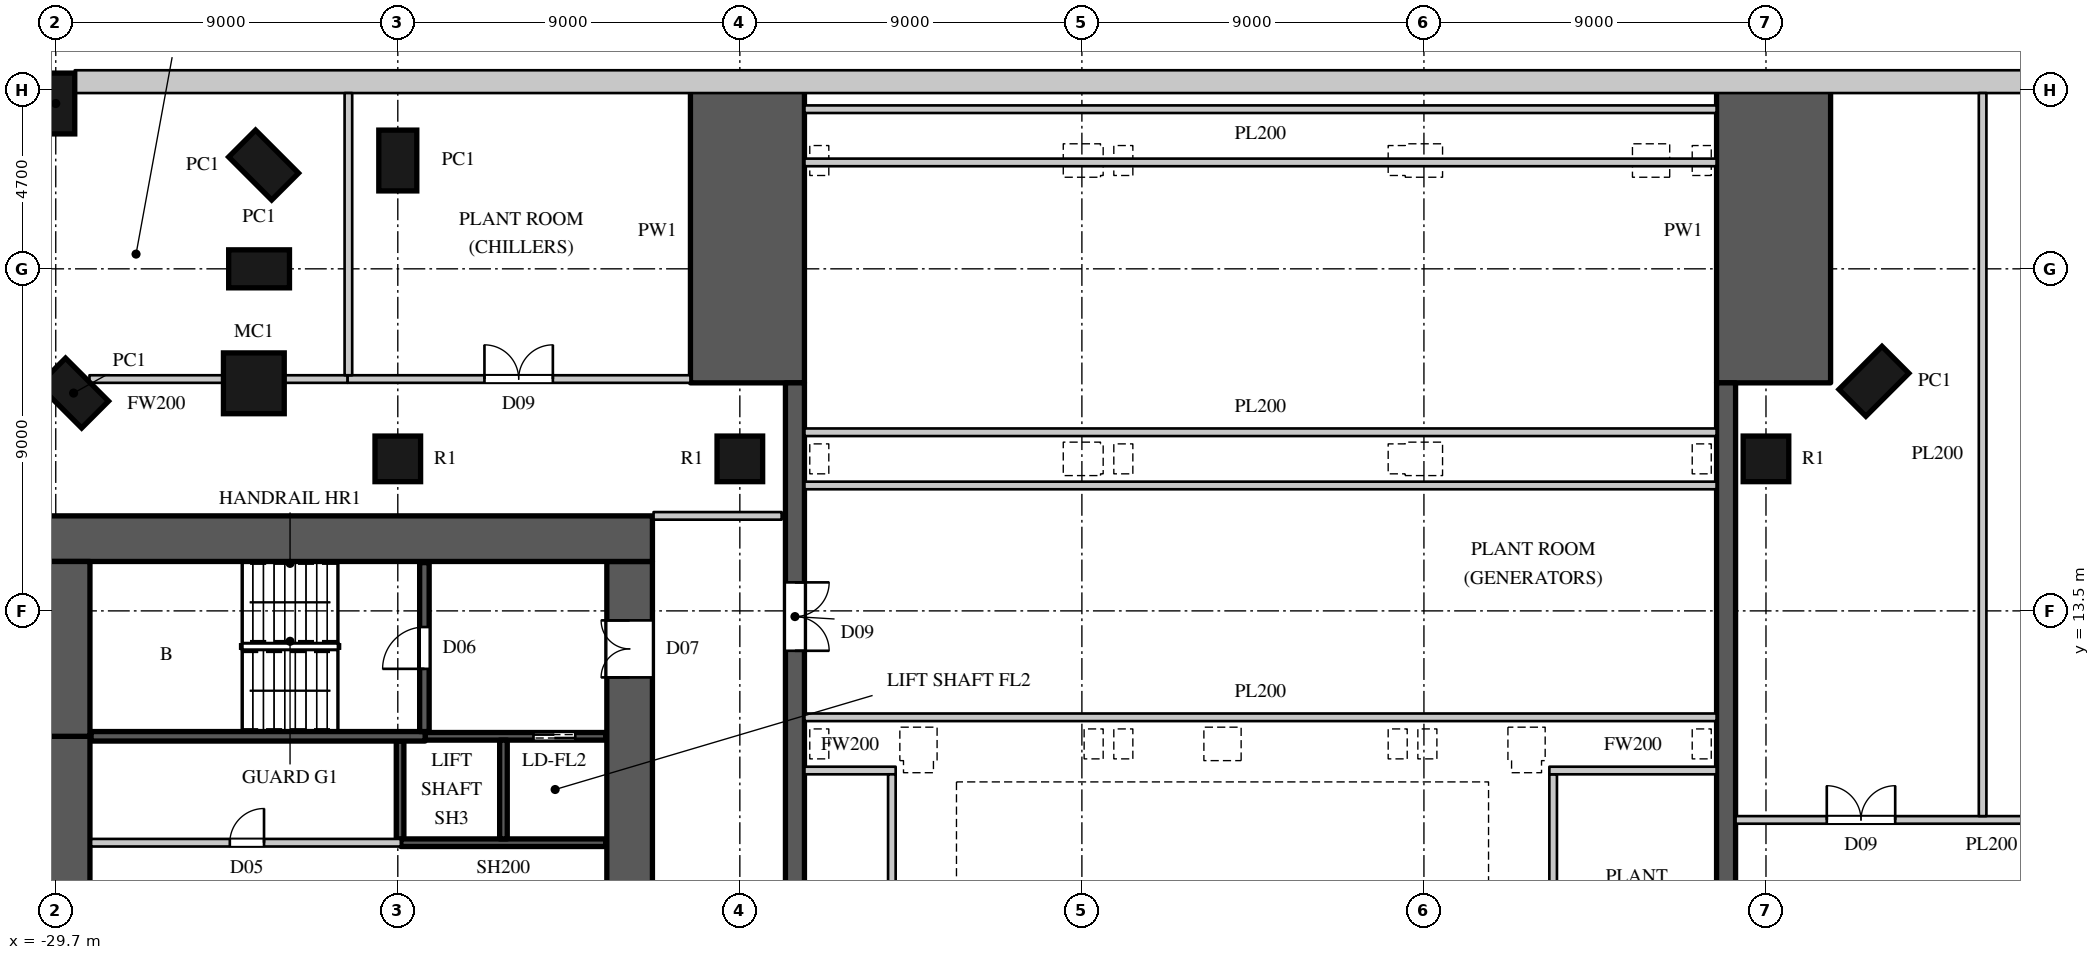
"""IFC4 building model, lengths in metres.
Left out: names, types, materials, properties, quantities, classifications, styles, units other than length and angle.
Written with IfcOpenShell. Run it as: python <this file> out.ifc"""

import sys

from ifc_helpers import new_model, si_unit, direction, frame, frame_2d, origin, origin_2d, place, context, subcontext, project, spatial, rectangle, circle, extrude, element, fill, save


model = new_model("IFC4")
c1 = context("Model", 3, precision=1e-05, world=origin(), true_north=direction((0.0, 1.0)))
c2 = subcontext(c1, "Body", "Model", "MODEL_VIEW")
j1 = project(units=[si_unit("LENGTHUNIT", "METRE"), si_unit("PLANEANGLEUNIT", "RADIAN")], contexts=[c1])
p1 = place(None, origin())
s1 = spatial("IfcSite", under=j1, at=p1, CompositionType="ELEMENT")
p2 = place(p1, origin())
s2 = spatial("IfcBuilding", under=s1, at=p2, CompositionType="ELEMENT")
p3 = place(p2, frame((0.0, 0.0, 29.0)))
s3 = spatial("IfcBuildingStorey", under=s2, at=p3, CompositionType="ELEMENT", Elevation=29.0)
for number, where, z_axis, x_axis in (
    (1, (-11.5, 19.5, 0.0), (0.0, 0.0, 1.0), (0.0, 1.0, 0.0)),
    (2, (15.5, 19.5, 0.0), (0.0, 0.0, 1.0), (0.0, 1.0, 0.0)),
):
    element("IfcWall", number, at=place(p3, frame(where, z_axis=z_axis, x_axis=x_axis)), inside=s3, PredefinedType="SOLIDWALL", context=c2, shape_type="SweptSolid", body=[
        extrude(rectangle(XDim=8.0, YDim=3.0, at=frame_2d((4.0, 0.0))), origin(), (0.0, 0.0, 1.0), 7.0),
    ])
p4 = place(p3, frame((-10.25, -19.5, 0.0), z_axis=(0.0, 0.0, 1.0), x_axis=(0.0, 1.0, 0.0)))
e3 = element("IfcWall", 3, at=p4, inside=s3, PredefinedType="SOLIDWALL", context=c2, shape_type="SweptSolid", body=[
    extrude(rectangle(XDim=39.0, YDim=0.5, at=frame_2d((19.5, 0.0))), origin(), (0.0, 0.0, 1.0), 7.0),
])
p5 = place(p4, frame((18.75, 0.0, 0.0)))
e4 = element("IfcOpeningElement", 4, at=p5, cuts=e3, PredefinedType="OPENING", context=c2, shape_type="SweptSolid", body=[
    extrude(rectangle(XDim=1.5, YDim=2.4, at=frame_2d((0.75, 1.2))), frame((0.0, 0.26, 0.0), z_axis=(0.0, -1.0, 0.0), x_axis=(1.0, 0.0, 0.0)), (0.0, 0.0, 1.0), 0.52),
])
p6 = place(p4, frame((31.95, 0.0, 0.0)))
e5 = element("IfcOpeningElement", 5, at=p6, cuts=e3, PredefinedType="OPENING", context=c2, shape_type="SweptSolid", body=[
    extrude(rectangle(XDim=1.8, YDim=2.4, at=frame_2d((0.9, 1.2))), frame((0.0, 0.26, 0.0), z_axis=(0.0, -1.0, 0.0), x_axis=(1.0, 0.0, 0.0)), (0.0, 0.0, 1.0), 0.52),
])
p7 = place(p4, frame((5.25, 0.0, 0.0)))
e6 = element("IfcOpeningElement", 6, at=p7, cuts=e3, PredefinedType="OPENING", context=c2, shape_type="SweptSolid", body=[
    extrude(rectangle(XDim=1.8, YDim=2.4, at=frame_2d((0.9, 1.2))), frame((0.0, 0.26, 0.0), z_axis=(0.0, -1.0, 0.0), x_axis=(1.0, 0.0, 0.0)), (0.0, 0.0, 1.0), 0.52),
])
p8 = place(p3, frame((14.25, -19.5, 0.0), z_axis=(0.0, 0.0, 1.0), x_axis=(0.0, 1.0, 0.0)))
e7 = element("IfcWall", 7, at=p8, inside=s3, PredefinedType="SOLIDWALL", context=c2, shape_type="SweptSolid", body=[
    extrude(rectangle(XDim=39.0, YDim=0.5, at=frame_2d((19.5, 0.0))), origin(), (0.0, 0.0, 1.0), 7.0),
])
for number, where, z_axis, x_axis in (
    (8, (-29.231, 19.231, 0.0), (0.0, 0.0, 1.0), (-0.707, -0.707, 0.0)),
    (9, (18.14, 19.54, 0.0), (0.0, 0.0, 1.0), (-0.707, 0.707, 0.0)),
    (10, (-20.7, 25.35, 0.0), (0.0, 0.0, 1.0), (-1.0, 0.0, 0.0)),
    (11, (-24.231, 25.231, 0.0), (0.0, 0.0, 1.0), (-0.707, -0.707, 0.0)),
    (12, (-24.35, 22.5, 0.0), (0.0, 0.0, 1.0), (0.0, -1.0, 0.0)),
):
    element("IfcColumn", number, at=place(p3, frame(where, z_axis=z_axis, x_axis=x_axis)), inside=s3, PredefinedType="COLUMN", context=c2, shape_type="SweptSolid", body=[
        extrude(rectangle(XDim=1.0, YDim=1.6, at=origin_2d()), origin(), (0.0, 0.0, 1.0), 7.0),
    ])
p9 = place(p3, frame((-24.488, 19.488, 0.0), z_axis=(0.0, 0.0, 1.0), x_axis=(1.0, 0.0, 0.0)))
e13 = element("IfcColumn", 13, at=p9, inside=s3, PredefinedType="COLUMN", context=c2, shape_type="SweptSolid", body=[
    extrude(circle(Radius=0.8, at=origin_2d()), origin(), (0.0, 0.0, 1.0), 7.0),
])
p10 = place(p3, frame((-29.7, 26.85, 0.0), z_axis=(0.0, 0.0, 1.0), x_axis=(-1.0, 0.0, 0.0)))
e14 = element("IfcColumn", 14, at=p10, inside=s3, PredefinedType="COLUMN", context=c2, shape_type="SweptSolid", body=[
    extrude(rectangle(XDim=1.0, YDim=1.6, at=origin_2d()), origin(), (0.0, 0.0, 1.0), 7.0),
])
for number, where, z_axis, x_axis in (
    (15, (-20.7, 17.5, 0.0), (0.0, 0.0, 1.0), (1.0, 0.0, 0.0)),
    (16, (-11.7, 17.5, 0.0), (0.0, 0.0, 1.0), (1.0, 0.0, 0.0)),
    (17, (15.3, 17.5, 0.0), (0.0, 0.0, 1.0), (1.0, 0.0, 0.0)),
):
    element("IfcColumn", number, at=place(p3, frame(where, z_axis=z_axis, x_axis=x_axis)), inside=s3, PredefinedType="COLUMN", context=c2, shape_type="SweptSolid", body=[
        extrude(circle(Radius=0.6, at=origin_2d()), origin(), (0.0, 0.0, 1.0), 7.0),
    ])
p11 = place(p3, frame((24.334, 27.425, 0.0), z_axis=(0.0, 0.0, 1.0), x_axis=(-1.0, 0.0, 0.0)))
e18 = element("IfcWall", 18, at=p11, inside=s3, PredefinedType="ELEMENTEDWALL", context=c2, shape_type="SweptSolid", body=[
    extrude(rectangle(XDim=53.534, YDim=0.6, at=frame_2d((26.767, 0.0))), origin(), (0.0, 0.0, 1.0), 6.6),
])
p12 = place(p3, frame((-30.0, 15.4, 0.0), z_axis=(0.0, 0.0, 1.0), x_axis=(1.0, 0.0, 0.0)))
e19 = element("IfcWall", 19, at=p12, inside=s3, PredefinedType="SHEAR", context=c2, shape_type="SweptSolid", body=[
    extrude(rectangle(XDim=16.0, YDim=1.2, at=frame_2d((8.0, 0.0))), origin(), (0.0, 0.0, 1.0), 7.0),
])
p13 = place(p3, frame((-14.6, -14.8, 0.0), z_axis=(0.0, 0.0, 1.0), x_axis=(0.0, 1.0, 0.0)))
e20 = element("IfcWall", 20, at=p13, inside=s3, PredefinedType="SHEAR", context=c2, shape_type="SweptSolid", body=[
    extrude(rectangle(XDim=29.6, YDim=1.2, at=frame_2d((14.8, 0.0))), origin(), (0.0, 0.0, 1.0), 7.0),
])
p14 = place(p13, frame((1.55, 0.0, 0.0)))
e21 = element("IfcOpeningElement", 21, at=p14, cuts=e20, PredefinedType="OPENING", context=c2, shape_type="SweptSolid", body=[
    extrude(rectangle(XDim=1.5, YDim=2.4, at=frame_2d((0.75, 1.2))), frame((0.0, 0.61, 0.0), z_axis=(0.0, -1.0, 0.0), x_axis=(1.0, 0.0, 0.0)), (0.0, 0.0, 1.0), 1.22),
])
p15 = place(p13, frame((26.55, 0.0, 0.0)))
e22 = element("IfcOpeningElement", 22, at=p15, cuts=e20, PredefinedType="OPENING", context=c2, shape_type="SweptSolid", body=[
    extrude(rectangle(XDim=1.5, YDim=2.4, at=frame_2d((0.75, 1.2))), frame((0.0, 0.61, 0.0), z_axis=(0.0, -1.0, 0.0), x_axis=(1.0, 0.0, 0.0)), (0.0, 0.0, 1.0), 1.22),
])
p16 = place(p13, frame((8.45, 0.0, 0.0)))
e23 = element("IfcOpeningElement", 23, at=p16, cuts=e20, PredefinedType="OPENING", context=c2, shape_type="SweptSolid", body=[
    extrude(rectangle(XDim=1.5, YDim=2.4, at=frame_2d((0.75, 1.2))), frame((0.0, 0.61, 0.0), z_axis=(0.0, -1.0, 0.0), x_axis=(1.0, 0.0, 0.0)), (0.0, 0.0, 1.0), 1.22),
])
p17 = place(p13, frame((19.65, 0.0, 0.0)))
e24 = element("IfcOpeningElement", 24, at=p17, cuts=e20, PredefinedType="OPENING", context=c2, shape_type="SweptSolid", body=[
    extrude(rectangle(XDim=1.5, YDim=2.4, at=frame_2d((0.75, 1.2))), frame((0.0, 0.61, 0.0), z_axis=(0.0, -1.0, 0.0), x_axis=(1.0, 0.0, 0.0)), (0.0, 0.0, 1.0), 1.22),
])
p18 = place(p13, frame((14.5, 0.0, 0.0)))
e25 = element("IfcOpeningElement", 25, at=p18, cuts=e20, PredefinedType="OPENING", context=c2, shape_type="SweptSolid", body=[
    extrude(rectangle(XDim=0.6, YDim=2.0, at=frame_2d((0.3, 1.0))), frame((0.0, 0.61, 0.0), z_axis=(0.0, -1.0, 0.0), x_axis=(1.0, 0.0, 0.0)), (0.0, 0.0, 1.0), 1.22),
])
p19 = place(p3, frame((-29.4, -10.2, 0.0), z_axis=(0.0, 0.0, 1.0), x_axis=(0.0, 1.0, 0.0)))
e26 = element("IfcWall", 26, at=p19, inside=s3, PredefinedType="SHEAR", context=c2, shape_type="SweptSolid", body=[
    extrude(rectangle(XDim=20.4, YDim=1.2, at=frame_2d((10.2, 0.0))), origin(), (0.0, 0.0, 1.0), 7.0),
])
p20 = place(p3, frame((-29.4, 10.2, 0.0), z_axis=(0.0, 0.0, 1.0), x_axis=(0.0, 1.0, 0.0)))
e27 = element("IfcWall", 27, at=p20, inside=s3, PredefinedType="SHEAR", context=c2, shape_type="SweptSolid", body=[
    extrude(rectangle(XDim=4.6, YDim=1.2, at=frame_2d((2.3, 0.0))), origin(), (0.0, 0.0, 1.0), 7.0),
])
p21 = place(p3, frame((-28.813, 19.6, 0.0), z_axis=(0.0, 0.0, 1.0), x_axis=(1.0, 0.0, 0.0)))
e28 = element("IfcWall", 28, at=p21, inside=s3, PredefinedType="PARTITIONING", context=c2, shape_type="SweptSolid", body=[
    extrude(rectangle(XDim=3.526, YDim=0.2, at=frame_2d((1.763, 0.0))), origin(), (0.0, 0.0, 1.0), 6.598),
])
p22 = place(p3, frame((-23.689, 19.6, 0.0), z_axis=(0.0, 0.0, 1.0), x_axis=(1.0, 0.0, 0.0)))
e29 = element("IfcWall", 29, at=p22, inside=s3, PredefinedType="PARTITIONING", context=c2, shape_type="SweptSolid", body=[
    extrude(rectangle(XDim=1.669, YDim=0.2, at=frame_2d((0.834, 0.0))), origin(), (0.0, 0.0, 1.0), 6.598),
])
p23 = place(p3, frame((-28.77, 7.4, 0.0), z_axis=(0.0, 0.0, 1.0), x_axis=(1.0, 0.0, 0.0)))
e30 = element("IfcWall", 30, at=p23, inside=s3, PredefinedType="PARTITIONING", context=c2, shape_type="SweptSolid", body=[
    extrude(rectangle(XDim=8.15, YDim=0.2, at=frame_2d((4.075, 0.0))), origin(), (0.0, 0.0, 1.0), 6.598),
])
p24 = place(p23, frame((3.65, 0.0, 0.0)))
e31 = element("IfcOpeningElement", 31, at=p24, cuts=e30, PredefinedType="OPENING", context=c2, shape_type="SweptSolid", body=[
    extrude(rectangle(XDim=0.9, YDim=2.2, at=frame_2d((0.45, 1.1))), frame((0.0, 0.11, 0.0), z_axis=(0.0, -1.0, 0.0), x_axis=(1.0, 0.0, 0.0)), (0.0, 0.0, 1.0), 0.22),
])
p25 = place(p3, frame((-13.97, 16.0, 0.0), z_axis=(0.0, 0.0, 1.0), x_axis=(1.0, 0.0, 0.0)))
e32 = element("IfcWall", 32, at=p25, inside=s3, PredefinedType="PARTITIONING", context=c2, shape_type="SweptSolid", body=[
    extrude(rectangle(XDim=3.37, YDim=0.2, at=frame_2d((1.685, 0.0))), origin(), (0.0, 0.0, 1.0), 6.598),
])
p26 = place(p3, frame((-10.0, 9.3, 0.0), z_axis=(0.0, 0.0, 1.0), x_axis=(1.0, 0.0, 0.0)))
e33 = element("IfcWall", 33, at=p26, inside=s3, PredefinedType="PARTITIONING", context=c2, shape_type="SweptSolid", body=[
    extrude(rectangle(XDim=2.4, YDim=0.2, at=frame_2d((1.2, 0.0))), origin(), (0.0, 0.0, 1.0), 6.598),
])
for number, where, z_axis, x_axis in (
    (34, (-7.7, -9.2, 0.0), (0.0, 0.0, 1.0), (0.0, 1.0, 0.0)),
    (35, (9.7, -9.2, 0.0), (0.0, 0.0, 1.0), (0.0, 1.0, 0.0)),
):
    element("IfcWall", number, at=place(p3, frame(where, z_axis=z_axis, x_axis=x_axis)), inside=s3, PredefinedType="PARTITIONING", context=c2, shape_type="SweptSolid", body=[
        extrude(rectangle(XDim=18.4, YDim=0.2, at=frame_2d((9.2, 0.0))), origin(), (0.0, 0.0, 1.0), 6.598),
    ])
p27 = place(p3, frame((9.6, 9.3, 0.0), z_axis=(0.0, 0.0, 1.0), x_axis=(1.0, 0.0, 0.0)))
e36 = element("IfcWall", 36, at=p27, inside=s3, PredefinedType="PARTITIONING", context=c2, shape_type="SweptSolid", body=[
    extrude(rectangle(XDim=4.4, YDim=0.2, at=frame_2d((2.2, 0.0))), origin(), (0.0, 0.0, 1.0), 6.598),
])
p28 = place(p3, frame((-22.02, 19.6, 0.0), z_axis=(0.0, 0.0, 1.0), x_axis=(1.0, 0.0, 0.0)))
e37 = element("IfcWall", 37, at=p28, inside=s3, PredefinedType="PARTITIONING", context=c2, shape_type="SweptSolid", body=[
    extrude(rectangle(XDim=9.02, YDim=0.2, at=frame_2d((4.51, 0.0))), origin(), (0.0, 0.0, 1.0), 6.598),
])
p29 = place(p28, frame((3.6, 0.0, 0.0)))
e38 = element("IfcOpeningElement", 38, at=p29, cuts=e37, PredefinedType="OPENING", context=c2, shape_type="SweptSolid", body=[
    extrude(rectangle(XDim=1.8, YDim=2.4, at=frame_2d((0.9, 1.2))), frame((0.0, 0.11, 0.0), z_axis=(0.0, -1.0, 0.0), x_axis=(1.0, 0.0, 0.0)), (0.0, 0.0, 1.0), 0.22),
])
p30 = place(p3, frame((-22.0, 19.7, 0.0), z_axis=(0.0, 0.0, 1.0), x_axis=(0.0, 1.0, 0.0)))
e39 = element("IfcWall", 39, at=p30, inside=s3, PredefinedType="PARTITIONING", context=c2, shape_type="SweptSolid", body=[
    extrude(rectangle(XDim=7.425, YDim=0.2, at=frame_2d((3.712, 0.0))), origin(), (0.0, 0.0, 1.0), 6.598),
])
for number, where, z_axis, x_axis in (
    (40, (-10.0, 26.7, 0.0), (0.0, 0.0, 1.0), (1.0, 0.0, 0.0)),
    (41, (-10.0, 10.7, 0.0), (0.0, 0.0, 1.0), (1.0, 0.0, 0.0)),
    (42, (-10.0, 16.8, 0.0), (0.0, 0.0, 1.0), (1.0, 0.0, 0.0)),
    (43, (-10.0, 18.2, 0.0), (0.0, 0.0, 1.0), (1.0, 0.0, 0.0)),
    (44, (-10.0, 25.3, 0.0), (0.0, 0.0, 1.0), (1.0, 0.0, 0.0)),
):
    element("IfcWall", number, at=place(p3, frame(where, z_axis=z_axis, x_axis=x_axis)), inside=s3, PredefinedType="PARTITIONING", context=c2, shape_type="SweptSolid", body=[
        extrude(rectangle(XDim=24.0, YDim=0.2, at=frame_2d((12.0, 0.0))), origin(), (0.0, 0.0, 1.0), 6.598),
    ])
p31 = place(p3, frame((14.5, 8.0, 0.0), z_axis=(0.0, 0.0, 1.0), x_axis=(1.0, 0.0, 0.0)))
e45 = element("IfcWall", 45, at=p31, inside=s3, PredefinedType="PARTITIONING", context=c2, shape_type="SweptSolid", body=[
    extrude(rectangle(XDim=13.47, YDim=0.2, at=frame_2d((6.735, 0.0))), origin(), (0.0, 0.0, 1.0), 6.598),
])
p32 = place(p31, frame((2.4, 0.0, 0.0)))
e46 = element("IfcOpeningElement", 46, at=p32, cuts=e45, PredefinedType="OPENING", context=c2, shape_type="SweptSolid", body=[
    extrude(rectangle(XDim=1.8, YDim=2.4, at=frame_2d((0.9, 1.2))), frame((0.0, 0.11, 0.0), z_axis=(0.0, -1.0, 0.0), x_axis=(1.0, 0.0, 0.0)), (0.0, 0.0, 1.0), 0.22),
])
p33 = place(p31, frame((9.05, 0.0, 0.0)))
e47 = element("IfcOpeningElement", 47, at=p33, cuts=e45, PredefinedType="OPENING", context=c2, shape_type="SweptSolid", body=[
    extrude(rectangle(XDim=1.8, YDim=2.4, at=frame_2d((0.9, 1.2))), frame((0.0, 0.11, 0.0), z_axis=(0.0, -1.0, 0.0), x_axis=(1.0, 0.0, 0.0)), (0.0, 0.0, 1.0), 0.22),
])
p34 = place(p3, frame((21.0, 8.1, 0.0), z_axis=(0.0, 0.0, 1.0), x_axis=(0.0, 1.0, 0.0)))
e48 = element("IfcWall", 48, at=p34, inside=s3, PredefinedType="PARTITIONING", context=c2, shape_type="SweptSolid", body=[
    extrude(rectangle(XDim=19.025, YDim=0.2, at=frame_2d((9.512, 0.0))), origin(), (0.0, 0.0, 1.0), 6.598),
])
p35 = place(p3, frame((-20.64, 7.5, 0.0), z_axis=(0.0, 0.0, 1.0), x_axis=(0.0, 1.0, 0.0)))
e49 = element("IfcWall", 49, at=p35, inside=s3, PredefinedType="SHEAR", context=c2, shape_type="SweptSolid", body=[
    extrude(rectangle(XDim=2.575, YDim=0.2, at=frame_2d((1.288, 0.0))), origin(), (0.0, 0.0, 1.0), 6.598),
])
p36 = place(p3, frame((-20.62, 7.4, 0.0), z_axis=(0.0, 0.0, 1.0), x_axis=(1.0, 0.0, 0.0)))
e50 = element("IfcWall", 50, at=p36, inside=s3, PredefinedType="SHEAR", context=c2, shape_type="SweptSolid", body=[
    extrude(rectangle(XDim=5.39, YDim=0.2, at=frame_2d((2.695, 0.0))), origin(), (0.0, 0.0, 1.0), 6.598),
])
p37 = place(p3, frame((-19.98, 10.2, 0.0), z_axis=(0.0, 0.0, 1.0), x_axis=(1.0, 0.0, 0.0)))
e51 = element("IfcWall", 51, at=p37, inside=s3, PredefinedType="SHEAR", context=c2, shape_type="SweptSolid", body=[
    extrude(rectangle(XDim=4.75, YDim=0.2, at=frame_2d((2.375, 0.0))), origin(), (0.0, 0.0, 1.0), 6.598),
])
p38 = place(p37, frame((2.85, 0.0, 0.0)))
e52 = element("IfcOpeningElement", 52, at=p38, cuts=e51, PredefinedType="OPENING", context=c2, shape_type="SweptSolid", body=[
    extrude(rectangle(XDim=1.1, YDim=2.2, at=frame_2d((0.55, 1.1))), frame((0.0, 0.11, 0.0), z_axis=(0.0, -1.0, 0.0), x_axis=(1.0, 0.0, 0.0)), (0.0, 0.0, 1.0), 0.22),
])
p39 = place(p3, frame((-17.92, 7.5, 0.0), z_axis=(0.0, 0.0, 1.0), x_axis=(0.0, 1.0, 0.0)))
e53 = element("IfcWall", 53, at=p39, inside=s3, PredefinedType="SHEAR", context=c2, shape_type="SweptSolid", body=[
    extrude(rectangle(XDim=2.6, YDim=0.2, at=frame_2d((1.3, 0.0))), origin(), (0.0, 0.0, 1.0), 7.0),
])
p40 = place(p3, frame((-28.77, 10.2, 0.0), z_axis=(0.0, 0.0, 1.0), x_axis=(1.0, 0.0, 0.0)))
e54 = element("IfcWall", 54, at=p40, inside=s3, PredefinedType="SHEAR", context=c2, shape_type="SweptSolid", body=[
    extrude(rectangle(XDim=8.79, YDim=0.25, at=frame_2d((4.395, 0.0))), origin(), (0.0, 0.0, 1.0), 6.598),
])
p41 = place(p3, frame((-20.0, 10.325, 0.0), z_axis=(0.0, 0.0, 1.0), x_axis=(0.0, 1.0, 0.0)))
e55 = element("IfcWall", 55, at=p41, inside=s3, PredefinedType="SHEAR", context=c2, shape_type="SweptSolid", body=[
    extrude(rectangle(XDim=4.445, YDim=0.25, at=frame_2d((2.223, 0.0))), origin(), (0.0, 0.0, 1.0), 6.598),
])
p42 = place(p41, frame((1.65, 0.0, 0.0)))
e56 = element("IfcOpeningElement", 56, at=p42, cuts=e55, PredefinedType="OPENING", context=c2, shape_type="SweptSolid", body=[
    extrude(rectangle(XDim=1.1, YDim=2.2, at=frame_2d((0.55, 1.1))), frame((0.0, 0.135, 0.0), z_axis=(0.0, -1.0, 0.0), x_axis=(1.0, 0.0, 0.0)), (0.0, 0.0, 1.0), 0.27),
])
p43 = place(p42, origin())
e57 = element("IfcDoor", 57, at=p43, inside=s3, OperationType="SINGLE_SWING_LEFT", PredefinedType="DOOR", context=c2, shape_type="SweptSolid", body=[
    extrude(rectangle(XDim=1.1, YDim=2.2, at=frame_2d((0.55, 1.1))), frame((0.0, 0.025, 0.0), z_axis=(0.0, -1.0, 0.0), x_axis=(1.0, 0.0, 0.0)), (0.0, 0.0, 1.0), 0.05),
])
fill(e56, e57)
p44 = place(p24, origin())
e58 = element("IfcDoor", 58, at=p44, inside=s3, OperationType="SINGLE_SWING_RIGHT", PredefinedType="DOOR", context=c2, shape_type="SweptSolid", body=[
    extrude(rectangle(XDim=0.9, YDim=2.2, at=frame_2d((0.45, 1.1))), frame((0.0, 0.025, 0.0), z_axis=(0.0, -1.0, 0.0), x_axis=(1.0, 0.0, 0.0)), (0.0, 0.0, 1.0), 0.05),
])
fill(e31, e58)
p45 = place(p38, origin())
e59 = element("IfcDoor", 59, at=p45, inside=s3, OperationType="DOUBLE_DOOR_SLIDING", PredefinedType="DOOR", context=c2, shape_type="SweptSolid", body=[
    extrude(rectangle(XDim=1.1, YDim=2.2, at=frame_2d((0.55, 1.1))), frame((0.0, 0.025, 0.0), z_axis=(0.0, -1.0, 0.0), x_axis=(1.0, 0.0, 0.0)), (0.0, 0.0, 1.0), 0.05),
])
fill(e52, e59)
p46 = place(p29, origin())
e60 = element("IfcDoor", 60, at=p46, inside=s3, OperationType="DOUBLE_DOOR_SINGLE_SWING", PredefinedType="DOOR", context=c2, shape_type="SweptSolid", body=[
    extrude(rectangle(XDim=1.8, YDim=2.4, at=frame_2d((0.9, 1.2))), frame((0.0, 0.025, 0.0), z_axis=(0.0, -1.0, 0.0), x_axis=(1.0, 0.0, 0.0)), (0.0, 0.0, 1.0), 0.05),
])
fill(e38, e60)
p47 = place(p6, origin())
e61 = element("IfcDoor", 61, at=p47, inside=s3, OperationType="DOUBLE_DOOR_SINGLE_SWING", PredefinedType="DOOR", context=c2, shape_type="SweptSolid", body=[
    extrude(rectangle(XDim=1.8, YDim=2.4, at=frame_2d((0.9, 1.2))), frame((0.0, -0.195, 0.0), z_axis=(0.0, -1.0, 0.0), x_axis=(1.0, 0.0, 0.0)), (0.0, 0.0, 1.0), 0.05),
])
fill(e5, e61)
p48 = place(p32, origin())
e62 = element("IfcDoor", 62, at=p48, inside=s3, OperationType="DOUBLE_DOOR_SINGLE_SWING", PredefinedType="DOOR", context=c2, shape_type="SweptSolid", body=[
    extrude(rectangle(XDim=1.8, YDim=2.4, at=frame_2d((0.9, 1.2))), frame((0.0, 0.025, 0.0), z_axis=(0.0, -1.0, 0.0), x_axis=(1.0, 0.0, 0.0)), (0.0, 0.0, 1.0), 0.05),
])
fill(e46, e62)
p49 = place(p15, origin())
e63 = element("IfcDoor", 63, at=p49, inside=s3, OperationType="DOUBLE_DOOR_SINGLE_SWING", PredefinedType="DOOR", context=c2, shape_type="SweptSolid", body=[
    extrude(rectangle(XDim=1.5, YDim=2.4, at=frame_2d((0.75, 1.2))), frame((0.0, 0.025, 0.0), z_axis=(0.0, -1.0, 0.0), x_axis=(1.0, 0.0, 0.0)), (0.0, 0.0, 1.0), 0.05),
])
fill(e22, e63)
save(model, sys.argv[1])
